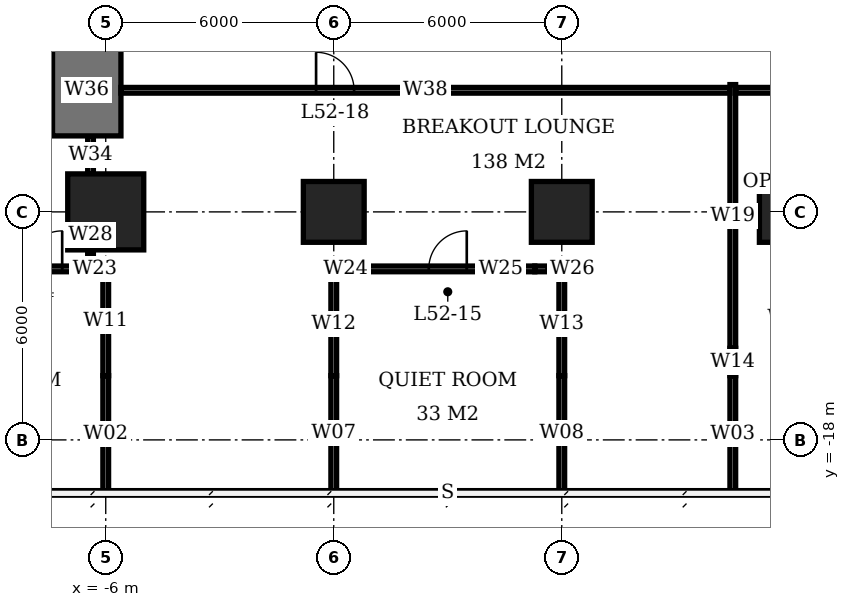
"""IFC4 building model, lengths in metres.
Left out: names, types, materials, properties, quantities, classifications, styles, units other than length and angle.
Written with IfcOpenShell. Run it as: python <this file> out.ifc"""

import sys

from ifc_helpers import new_model, si_unit, direction, frame, frame_2d, origin, origin_2d, place, context, subcontext, project, spatial, rectangle, extrude, element, fill, save


model = new_model("IFC4")
c1 = context("Model", 3, precision=1e-05, world=origin(), true_north=direction((0.0, 1.0)))
c2 = subcontext(c1, "Body", "Model", "MODEL_VIEW")
j1 = project(units=[si_unit("LENGTHUNIT", "METRE"), si_unit("PLANEANGLEUNIT", "RADIAN")], contexts=[c1])
p1 = place(None, origin())
s1 = spatial("IfcSite", under=j1, at=p1, CompositionType="ELEMENT")
p2 = place(p1, origin())
s2 = spatial("IfcBuilding", under=s1, at=p2, CompositionType="ELEMENT")
p3 = place(p2, frame((0.0, 0.0, 212.3)))
s3 = spatial("IfcBuildingStorey", under=s2, at=p3, CompositionType="ELEMENT", Elevation=212.3)
p4 = place(p3, frame((-6.0, -12.0, 0.0), z_axis=(0.0, 0.0, 1.0), x_axis=(1.0, 0.0, 0.0)))
e1 = element("IfcColumn", 1, at=p4, inside=s3, PredefinedType="COLUMN", context=c2, shape_type="SweptSolid", body=[
    extrude(rectangle(XDim=2.0, YDim=2.0, at=origin_2d()), origin(), (0.0, 0.0, 1.0), 3.9),
])
for number, where, z_axis, x_axis in (
    (2, (0.0, -12.0, 0.0), (0.0, 0.0, 1.0), (1.0, 0.0, 0.0)),
    (3, (6.0, -12.0, 0.0), (0.0, 0.0, 1.0), (1.0, 0.0, 0.0)),
    (4, (12.0, -12.0, 0.0), (0.0, 0.0, 1.0), (1.0, 0.0, 0.0)),
):
    element("IfcColumn", number, at=place(p3, frame(where, z_axis=z_axis, x_axis=x_axis)), inside=s3, PredefinedType="COLUMN", context=c2, shape_type="SweptSolid", body=[
        extrude(rectangle(XDim=1.6, YDim=1.6, at=origin_2d()), origin(), (0.0, 0.0, 1.0), 3.9),
    ])
p5 = place(p3, frame((-6.5, -10.0, 0.0), z_axis=(0.0, 0.0, 1.0), x_axis=(0.0, 1.0, 0.0)))
e5 = element("IfcWall", 5, at=p5, inside=s3, PredefinedType="SHEAR", context=c2, shape_type="SweptSolid", body=[
    extrude(rectangle(XDim=2.4, YDim=1.8, at=frame_2d((1.2, 0.0))), origin(), (0.0, 0.0, 1.0), 3.9),
])
p6 = place(p3, frame((-9.292, -13.5, 0.0), z_axis=(0.0, 0.0, 1.0), x_axis=(1.0, 0.0, 0.0)))
e6 = element("IfcWall", 6, at=p6, inside=s3, PredefinedType="PARTITIONING", context=c2, shape_type="SweptSolid", body=[
    extrude(rectangle(XDim=3.217, YDim=0.15, at=frame_2d((1.608, 0.0))), origin(), (0.0, 0.0, 1.0), 2.65),
])
p7 = place(p6, frame((1.146, 0.0, 0.0)))
e7 = element("IfcOpeningElement", 7, at=p7, cuts=e6, PredefinedType="OPENING", context=c2, shape_type="SweptSolid", body=[
    extrude(rectangle(XDim=1.0, YDim=2.1, at=frame_2d((0.5, 1.05))), frame((0.0, 0.085, 0.0), z_axis=(0.0, -1.0, 0.0), x_axis=(1.0, 0.0, 0.0)), (0.0, 0.0, 1.0), 0.17),
])
p8 = place(p3, frame((-0.075, -13.5, 0.0), z_axis=(0.0, 0.0, 1.0), x_axis=(1.0, 0.0, 0.0)))
e8 = element("IfcWall", 8, at=p8, inside=s3, PredefinedType="PARTITIONING", context=c2, shape_type="SweptSolid", body=[
    extrude(rectangle(XDim=0.785, YDim=0.15, at=frame_2d((0.393, 0.0))), origin(), (0.0, 0.0, 1.0), 2.65),
])
p9 = place(p3, frame((0.71, -13.5, 0.0), z_axis=(0.0, 0.0, 1.0), x_axis=(1.0, 0.0, 0.0)))
e9 = element("IfcWall", 9, at=p9, inside=s3, PredefinedType="PARTITIONING", context=c2, shape_type="SweptSolid", body=[
    extrude(rectangle(XDim=4.58, YDim=0.15, at=frame_2d((2.29, 0.0))), origin(), (0.0, 0.0, 1.0), 3.65),
])
p10 = place(p9, frame((1.79, 0.0, 0.0)))
e10 = element("IfcOpeningElement", 10, at=p10, cuts=e9, PredefinedType="OPENING", context=c2, shape_type="SweptSolid", body=[
    extrude(rectangle(XDim=1.0, YDim=2.1, at=frame_2d((0.5, 1.05))), frame((0.0, 0.085, 0.0), z_axis=(0.0, -1.0, 0.0), x_axis=(1.0, 0.0, 0.0)), (0.0, 0.0, 1.0), 0.17),
])
p11 = place(p3, frame((5.29, -13.5, 0.0), z_axis=(0.0, 0.0, 1.0), x_axis=(1.0, 0.0, 0.0)))
e11 = element("IfcWall", 11, at=p11, inside=s3, PredefinedType="PARTITIONING", context=c2, shape_type="SweptSolid", body=[
    extrude(rectangle(XDim=0.785, YDim=0.15, at=frame_2d((0.393, 0.0))), origin(), (0.0, 0.0, 1.0), 2.65),
])
p12 = place(p3, frame((-6.0, -19.4, 0.0), z_axis=(0.0, 0.0, 1.0), x_axis=(0.0, 1.0, 0.0)))
e12 = element("IfcWall", 12, at=p12, inside=s3, PredefinedType="PARTITIONING", context=c2, shape_type="SweptSolid", body=[
    extrude(rectangle(XDim=3.09, YDim=0.15, at=frame_2d((1.545, 0.0))), origin(), (0.0, 0.0, 1.0), 3.65),
])
p13 = place(p3, frame((-6.0, -16.31, 0.0), z_axis=(0.0, 0.0, 1.0), x_axis=(0.0, 1.0, 0.0)))
e13 = element("IfcWall", 13, at=p13, inside=s3, PredefinedType="PARTITIONING", context=c2, shape_type="SweptSolid", body=[
    extrude(rectangle(XDim=2.885, YDim=0.15, at=frame_2d((1.442, 0.0))), origin(), (0.0, 0.0, 1.0), 2.65),
])
p14 = place(p3, frame((0.0, -19.35, 0.0), z_axis=(0.0, 0.0, 1.0), x_axis=(0.0, 1.0, 0.0)))
e14 = element("IfcWall", 14, at=p14, inside=s3, PredefinedType="PARTITIONING", context=c2, shape_type="SweptSolid", body=[
    extrude(rectangle(XDim=3.04, YDim=0.15, at=frame_2d((1.52, 0.0))), origin(), (0.0, 0.0, 1.0), 3.65),
])
p15 = place(p3, frame((0.0, -16.31, 0.0), z_axis=(0.0, 0.0, 1.0), x_axis=(0.0, 1.0, 0.0)))
e15 = element("IfcWall", 15, at=p15, inside=s3, PredefinedType="PARTITIONING", context=c2, shape_type="SweptSolid", body=[
    extrude(rectangle(XDim=2.735, YDim=0.15, at=frame_2d((1.368, 0.0))), origin(), (0.0, 0.0, 1.0), 2.65),
])
p16 = place(p3, frame((6.0, -19.35, 0.0), z_axis=(0.0, 0.0, 1.0), x_axis=(0.0, 1.0, 0.0)))
e16 = element("IfcWall", 16, at=p16, inside=s3, PredefinedType="PARTITIONING", context=c2, shape_type="SweptSolid", body=[
    extrude(rectangle(XDim=3.04, YDim=0.15, at=frame_2d((1.52, 0.0))), origin(), (0.0, 0.0, 1.0), 3.65),
])
p17 = place(p3, frame((6.0, -16.31, 0.0), z_axis=(0.0, 0.0, 1.0), x_axis=(0.0, 1.0, 0.0)))
e17 = element("IfcWall", 17, at=p17, inside=s3, PredefinedType="PARTITIONING", context=c2, shape_type="SweptSolid", body=[
    extrude(rectangle(XDim=2.735, YDim=0.15, at=frame_2d((1.368, 0.0))), origin(), (0.0, 0.0, 1.0), 2.65),
])
p18 = place(p3, frame((-6.4, -13.425, 0.0), z_axis=(0.0, 0.0, 1.0), x_axis=(0.0, 1.0, 0.0)))
e18 = element("IfcWall", 18, at=p18, inside=s3, PredefinedType="PARTITIONING", context=c2, shape_type="SweptSolid", body=[
    extrude(rectangle(XDim=0.425, YDim=0.15, at=frame_2d((0.212, 0.0))), origin(), (0.0, 0.0, 1.0), 2.65),
])
p19 = place(p3, frame((-6.4, -11.0, 0.0), z_axis=(0.0, 0.0, 1.0), x_axis=(0.0, 1.0, 0.0)))
e19 = element("IfcWall", 19, at=p19, inside=s3, PredefinedType="PARTITIONING", context=c2, shape_type="SweptSolid", body=[
    extrude(rectangle(XDim=1.0, YDim=0.15, at=frame_2d((0.5, 0.0))), origin(), (0.0, 0.0, 1.0), 3.65),
])
p20 = place(p3, frame((-5.6, -8.8, 0.0), z_axis=(0.0, 0.0, 1.0), x_axis=(1.0, 0.0, 0.0)))
e20 = element("IfcWall", 20, at=p20, inside=s3, PredefinedType="PARTITIONING", context=c2, shape_type="SweptSolid", body=[
    extrude(rectangle(XDim=16.025, YDim=0.15, at=frame_2d((8.013, 0.0))), origin(), (0.0, 0.0, 1.0), 3.65),
])
p21 = place(p20, frame((5.135, 0.0, 0.0)))
e21 = element("IfcOpeningElement", 21, at=p21, cuts=e20, PredefinedType="OPENING", context=c2, shape_type="SweptSolid", body=[
    extrude(rectangle(XDim=1.0, YDim=2.1, at=frame_2d((0.5, 1.05))), frame((0.0, 0.085, 0.0), z_axis=(0.0, -1.0, 0.0), x_axis=(1.0, 0.0, 0.0)), (0.0, 0.0, 1.0), 0.17),
])
p22 = place(p3, frame((10.5, -19.4, 0.0), z_axis=(0.0, 0.0, 1.0), x_axis=(0.0, 1.0, 0.0)))
e22 = element("IfcWall", 22, at=p22, inside=s3, PredefinedType="PARTITIONING", context=c2, shape_type="SweptSolid", body=[
    extrude(rectangle(XDim=3.09, YDim=0.15, at=frame_2d((1.545, 0.0))), origin(), (0.0, 0.0, 1.0), 3.65),
])
p23 = place(p3, frame((10.5, -16.31, 0.0), z_axis=(0.0, 0.0, 1.0), x_axis=(0.0, 1.0, 0.0)))
e23 = element("IfcWall", 23, at=p23, inside=s3, PredefinedType="PARTITIONING", context=c2, shape_type="SweptSolid", body=[
    extrude(rectangle(XDim=0.72, YDim=0.15, at=frame_2d((0.36, 0.0))), origin(), (0.0, 0.0, 1.0), 2.65),
])
p24 = place(p3, frame((10.5, -15.59, 0.0), z_axis=(0.0, 0.0, 1.0), x_axis=(0.0, 1.0, 0.0)))
e24 = element("IfcWall", 24, at=p24, inside=s3, PredefinedType="PARTITIONING", context=c2, shape_type="SweptSolid", body=[
    extrude(rectangle(XDim=6.94, YDim=0.15, at=frame_2d((3.47, 0.0))), origin(), (0.0, 0.0, 1.0), 3.65),
])
p25 = place(p3, frame((10.575, -8.8, 0.0), z_axis=(0.0, 0.0, 1.0), x_axis=(1.0, 0.0, 0.0)))
e25 = element("IfcWall", 25, at=p25, inside=s3, PredefinedType="PARTITIONING", context=c2, shape_type="SweptSolid", body=[
    extrude(rectangle(XDim=7.025, YDim=0.15, at=frame_2d((3.513, 0.0))), origin(), (0.0, 0.0, 1.0), 3.65),
])
p26 = place(p25, frame((1.91, 0.0, 0.0)))
e26 = element("IfcOpeningElement", 26, at=p26, cuts=e25, PredefinedType="OPENING", context=c2, shape_type="SweptSolid", body=[
    extrude(rectangle(XDim=1.0, YDim=2.1, at=frame_2d((0.5, 1.05))), frame((0.0, 0.085, 0.0), z_axis=(0.0, -1.0, 0.0), x_axis=(1.0, 0.0, 0.0)), (0.0, 0.0, 1.0), 0.17),
])
p27 = place(p7, origin())
e27 = element("IfcDoor", 27, at=p27, inside=s3, OperationType="SINGLE_SWING_RIGHT", PredefinedType="DOOR", context=c2, shape_type="SweptSolid", body=[
    extrude(rectangle(XDim=1.0, YDim=2.1, at=frame_2d((0.5, 1.05))), frame((0.0, 0.025, 0.0), z_axis=(0.0, -1.0, 0.0), x_axis=(1.0, 0.0, 0.0)), (0.0, 0.0, 1.0), 0.05),
])
fill(e7, e27)
p28 = place(p10, origin())
e28 = element("IfcDoor", 28, at=p28, inside=s3, OperationType="SINGLE_SWING_RIGHT", PredefinedType="DOOR", context=c2, shape_type="SweptSolid", body=[
    extrude(rectangle(XDim=1.0, YDim=2.1, at=frame_2d((0.5, 1.05))), frame((0.0, 0.025, 0.0), z_axis=(0.0, -1.0, 0.0), x_axis=(1.0, 0.0, 0.0)), (0.0, 0.0, 1.0), 0.05),
])
fill(e10, e28)
p29 = place(p21, origin())
e29 = element("IfcDoor", 29, at=p29, inside=s3, OperationType="SINGLE_SWING_LEFT", PredefinedType="DOOR", context=c2, shape_type="SweptSolid", body=[
    extrude(rectangle(XDim=1.0, YDim=2.1, at=frame_2d((0.5, 1.05))), frame((0.0, 0.025, 0.0), z_axis=(0.0, -1.0, 0.0), x_axis=(1.0, 0.0, 0.0)), (0.0, 0.0, 1.0), 0.05),
])
fill(e21, e29)
save(model, sys.argv[1])
